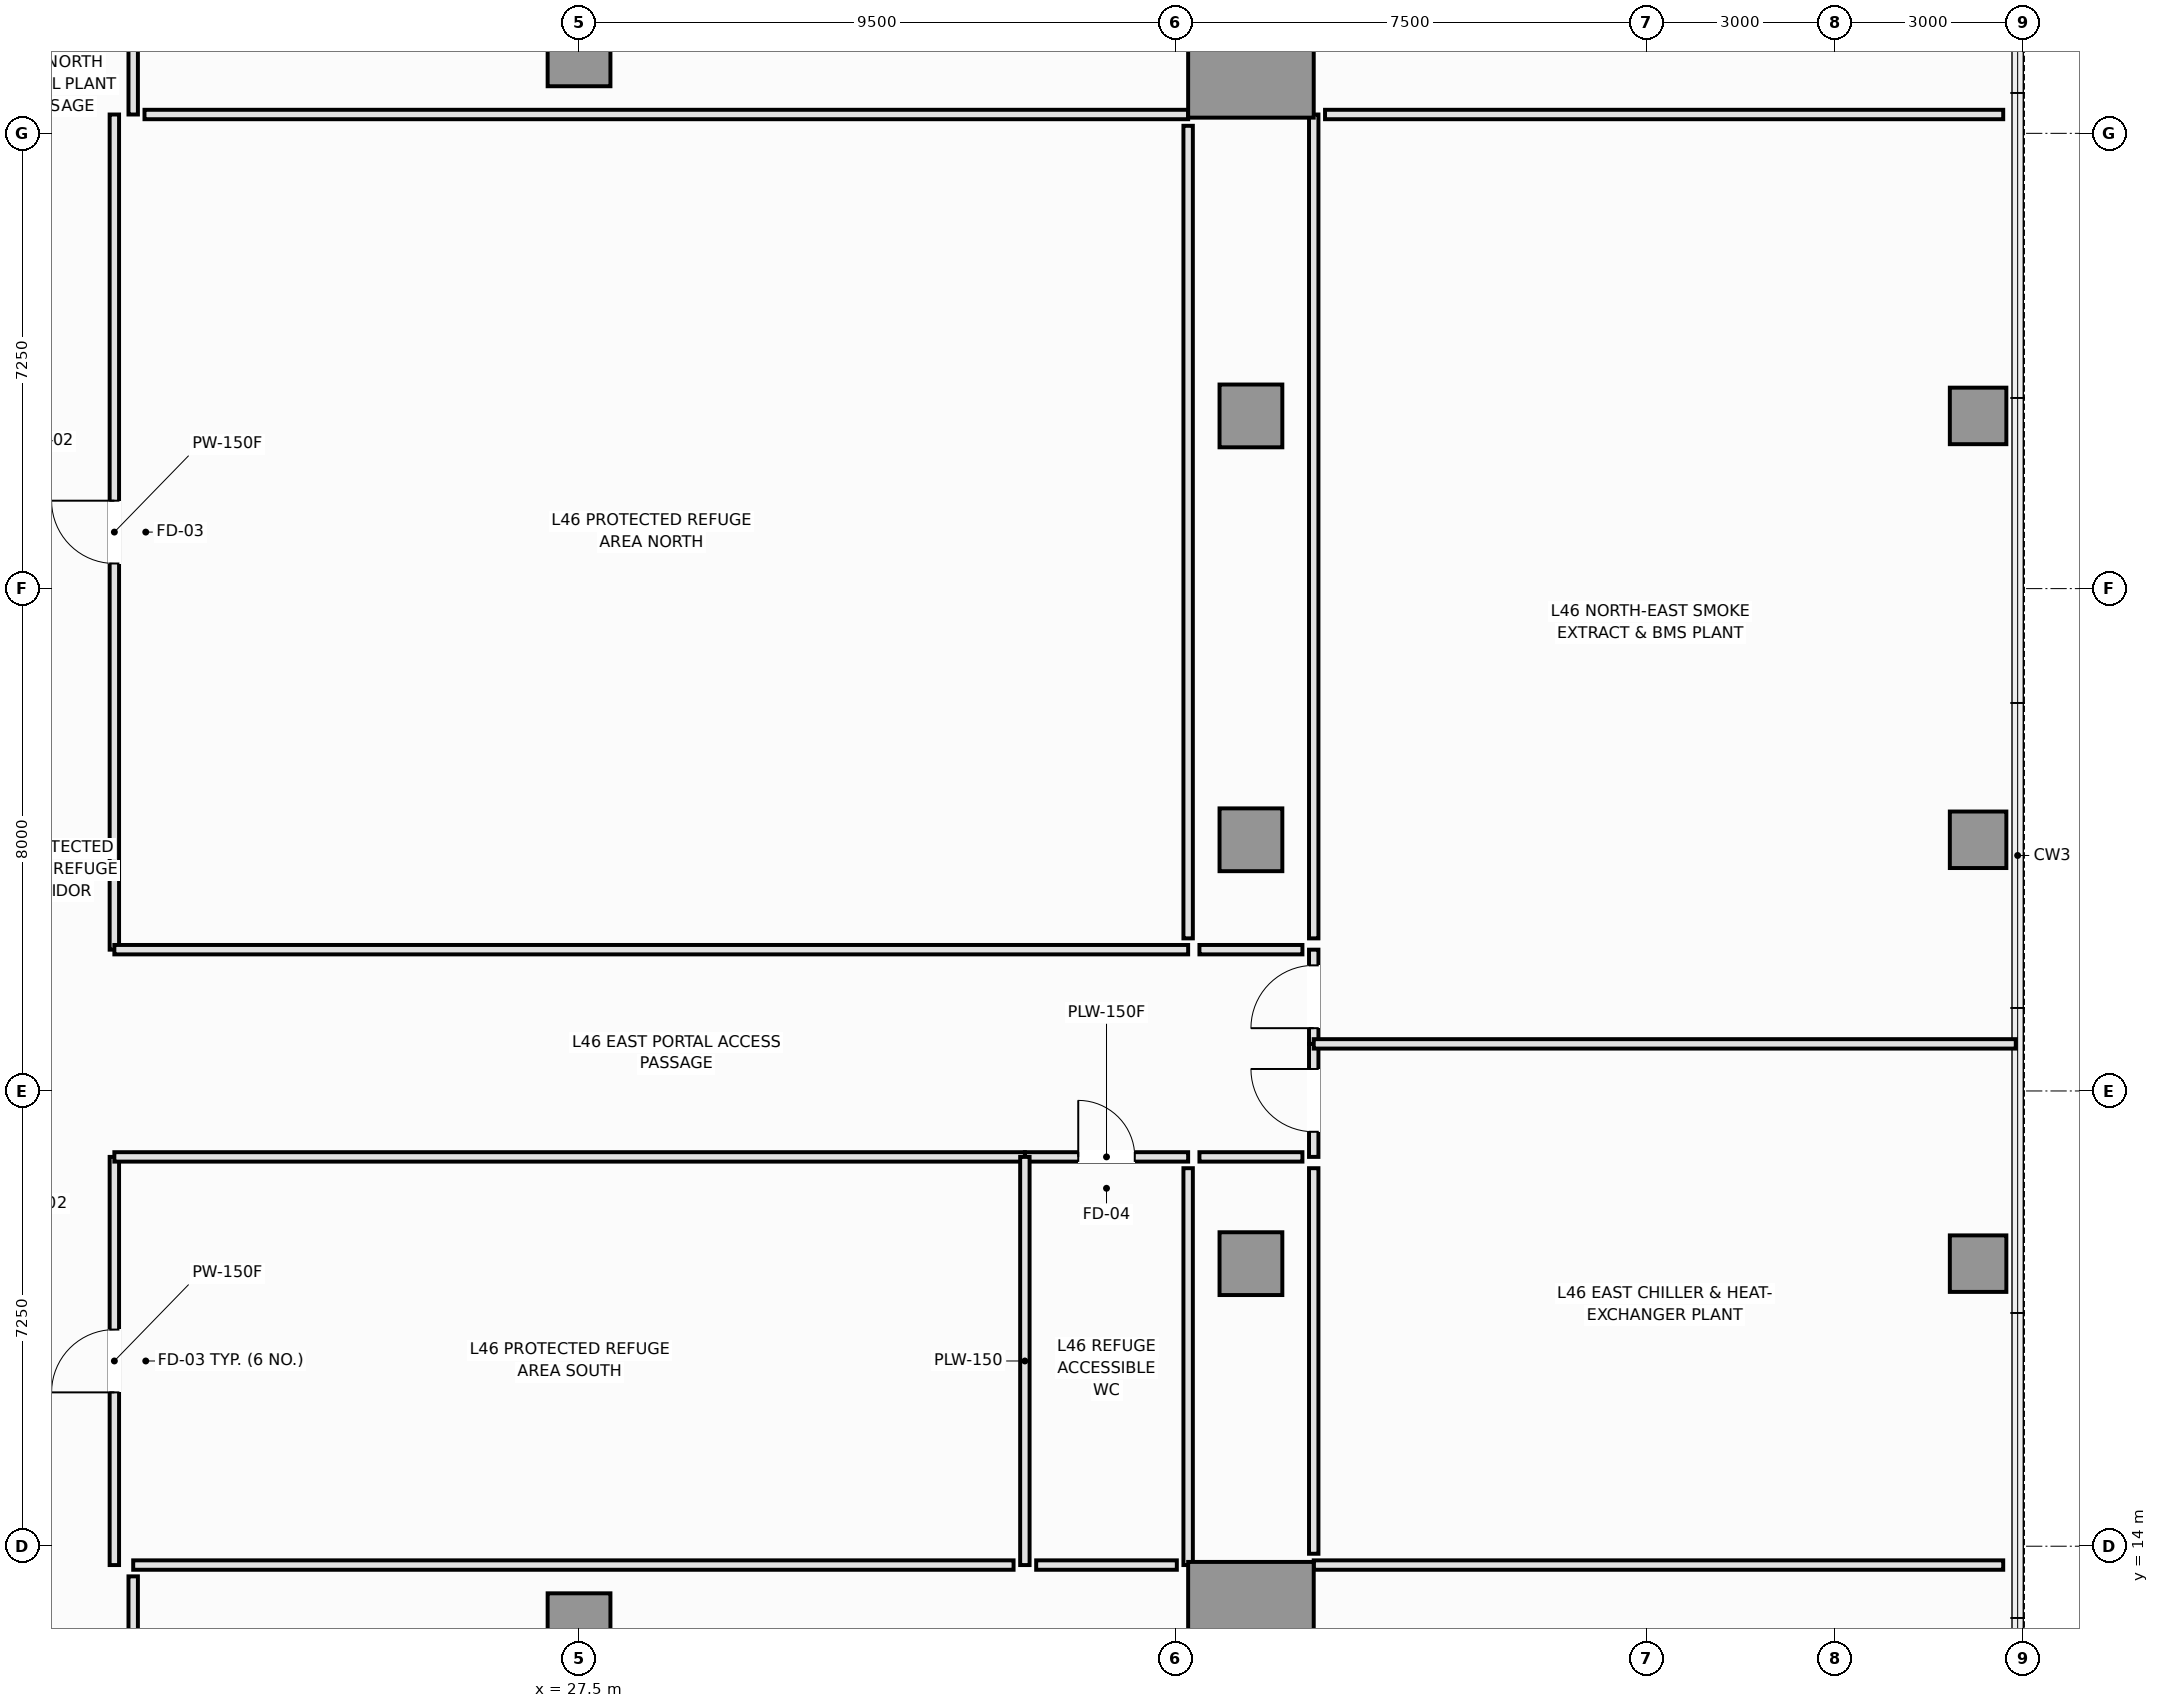
"""IFC4 building model, lengths in metres.
Left out: names, types, materials, properties, quantities, classifications, styles, units other than length and angle.
Written with IfcOpenShell. Run it as: python <this file> out.ifc"""

import sys

from ifc_helpers import new_model, si_unit, direction, frame, frame_2d, origin, origin_2d, place, context, subcontext, project, spatial, rectangle, extrude, element, fill, save


model = new_model("IFC4")
c1 = context("Model", 3, precision=1e-05, world=origin(), true_north=direction((0.0, 1.0)))
c2 = subcontext(c1, "Body", "Model", "MODEL_VIEW")
j1 = project(units=[si_unit("LENGTHUNIT", "METRE"), si_unit("PLANEANGLEUNIT", "RADIAN")], contexts=[c1])
p1 = place(None, origin())
s1 = spatial("IfcSite", under=j1, at=p1, CompositionType="ELEMENT")
p2 = place(p1, origin())
s2 = spatial("IfcBuilding", under=s1, at=p2, CompositionType="ELEMENT")
p3 = place(p2, frame((0.0, 0.0, 173.25)))
s3 = spatial("IfcBuildingStorey", under=s2, at=p3, CompositionType="ELEMENT", Elevation=173.25)
for number, where, z_axis, x_axis in (
    (1, (38.2, 12.75, 0.0), (0.0, 0.0, 1.0), (1.0, 0.0, 0.0)),
    (2, (38.2, 37.75, 0.0), (0.0, 0.0, 1.0), (1.0, 0.0, 0.0)),
):
    element("IfcColumn", number, at=place(p3, frame(where, z_axis=z_axis, x_axis=x_axis)), inside=s3, PredefinedType="COLUMN", context=c2, shape_type="SweptSolid", body=[
        extrude(rectangle(XDim=2.0, YDim=2.0, at=origin_2d()), origin(), (0.0, 0.0, 1.0), 4.8),
    ])
for number, where, z_axis, x_axis in (
    (3, (27.5, 12.75, 0.0), (0.0, 0.0, 1.0), (1.0, 0.0, 0.0)),
    (4, (27.5, 37.75, 0.0), (0.0, 0.0, 1.0), (1.0, 0.0, 0.0)),
    (5, (38.2, 18.5, 0.0), (0.0, 0.0, 1.0), (1.0, 0.0, 0.0)),
    (6, (38.2, 25.25, 0.0), (0.0, 0.0, 1.0), (1.0, 0.0, 0.0)),
    (7, (38.2, 32.0, 0.0), (0.0, 0.0, 1.0), (1.0, 0.0, 0.0)),
):
    element("IfcColumn", number, at=place(p3, frame(where, z_axis=z_axis, x_axis=x_axis)), inside=s3, PredefinedType="COLUMN", context=c2, shape_type="SweptSolid", body=[
        extrude(rectangle(XDim=1.0, YDim=1.0, at=origin_2d()), origin(), (0.0, 0.0, 1.0), 4.8),
    ])
for number, where, z_axis, x_axis in (
    (8, (49.78, 18.5, 0.0), (0.0, 0.0, 1.0), (1.0, 0.0, 0.0)),
    (9, (49.78, 25.25, 0.0), (0.0, 0.0, 1.0), (1.0, 0.0, 0.0)),
    (10, (49.78, 32.0, 0.0), (0.0, 0.0, 1.0), (1.0, 0.0, 0.0)),
):
    element("IfcColumn", number, at=place(p3, frame(where, z_axis=z_axis, x_axis=x_axis)), inside=s3, PredefinedType="COLUMN", context=c2, shape_type="SweptSolid", body=[
        extrude(rectangle(XDim=0.9, YDim=0.9, at=origin_2d()), origin(), (0.0, 0.0, 1.0), 4.8),
    ])
p4 = place(p3, frame((20.1, 13.7, 0.0), z_axis=(0.0, 0.0, 1.0), x_axis=(0.0, 1.0, 0.0)))
e11 = element("IfcWall", 11, at=p4, inside=s3, PredefinedType="PARTITIONING", context=c2, shape_type="SweptSolid", body=[
    extrude(rectangle(XDim=6.5, YDim=0.15, at=frame_2d((3.25, 0.0))), origin(), (0.0, 0.0, 1.0), 4.6),
])
p5 = place(p4, frame((2.75, 0.0, 0.0)))
e12 = element("IfcOpeningElement", 12, at=p5, cuts=e11, PredefinedType="OPENING", context=c2, shape_type="SweptSolid", body=[
    extrude(rectangle(XDim=1.0, YDim=2.15, at=frame_2d((0.5, 1.075))), frame((0.0, 0.085, 0.0), z_axis=(0.0, -1.0, 0.0), x_axis=(1.0, 0.0, 0.0)), (0.0, 0.0, 1.0), 0.17),
])
p6 = place(p3, frame((20.1, 23.5, 0.0), z_axis=(0.0, 0.0, 1.0), x_axis=(0.0, 1.0, 0.0)))
e13 = element("IfcWall", 13, at=p6, inside=s3, PredefinedType="PARTITIONING", context=c2, shape_type="SweptSolid", body=[
    extrude(rectangle(XDim=13.3, YDim=0.15, at=frame_2d((6.65, 0.0))), origin(), (0.0, 0.0, 1.0), 4.6),
])
p7 = place(p6, frame((6.15, 0.0, 0.0)))
e14 = element("IfcOpeningElement", 14, at=p7, cuts=e13, PredefinedType="OPENING", context=c2, shape_type="SweptSolid", body=[
    extrude(rectangle(XDim=1.0, YDim=2.15, at=frame_2d((0.5, 1.075))), frame((0.0, 0.085, 0.0), z_axis=(0.0, -1.0, 0.0), x_axis=(1.0, 0.0, 0.0)), (0.0, 0.0, 1.0), 0.17),
])
p8 = place(p3, frame((34.6, 20.2, 0.0), z_axis=(0.0, 0.0, 1.0), x_axis=(1.0, 0.0, 0.0)))
e15 = element("IfcWall", 15, at=p8, inside=s3, PredefinedType="PLUMBINGWALL", context=c2, shape_type="SweptSolid", body=[
    extrude(rectangle(XDim=2.6, YDim=0.15, at=frame_2d((1.3, 0.0))), origin(), (0.0, 0.0, 1.0), 4.6),
])
p9 = place(p8, frame((0.85, 0.0, 0.0)))
e16 = element("IfcOpeningElement", 16, at=p9, cuts=e15, PredefinedType="OPENING", context=c2, shape_type="SweptSolid", body=[
    extrude(rectangle(XDim=0.9, YDim=2.1, at=frame_2d((0.45, 1.05))), frame((0.0, 0.085, 0.0), z_axis=(0.0, -1.0, 0.0), x_axis=(1.0, 0.0, 0.0)), (0.0, 0.0, 1.0), 0.17),
])
p10 = place(p3, frame((20.1, 20.2, 0.0), z_axis=(0.0, 0.0, 1.0), x_axis=(1.0, 0.0, 0.0)))
e17 = element("IfcWall", 17, at=p10, inside=s3, PredefinedType="PARTITIONING", context=c2, shape_type="SweptSolid", body=[
    extrude(rectangle(XDim=14.5, YDim=0.15, at=frame_2d((7.25, 0.0))), origin(), (0.0, 0.0, 1.0), 4.6),
])
p11 = place(p3, frame((20.1, 23.5, 0.0), z_axis=(0.0, 0.0, 1.0), x_axis=(1.0, 0.0, 0.0)))
e18 = element("IfcWall", 18, at=p11, inside=s3, PredefinedType="PARTITIONING", context=c2, shape_type="SweptSolid", body=[
    extrude(rectangle(XDim=17.1, YDim=0.15, at=frame_2d((8.55, 0.0))), origin(), (0.0, 0.0, 1.0), 4.6),
])
p12 = place(p3, frame((39.2, 20.2, 0.0), z_axis=(0.0, 0.0, 1.0), x_axis=(0.0, 1.0, 0.0)))
e19 = element("IfcWall", 19, at=p12, inside=s3, PredefinedType="PARTITIONING", context=c2, shape_type="SweptSolid", body=[
    extrude(rectangle(XDim=1.8, YDim=0.15, at=frame_2d((0.9, 0.0))), origin(), (0.0, 0.0, 1.0), 4.6),
])
p13 = place(p12, frame((0.4, 0.0, 0.0)))
e20 = element("IfcOpeningElement", 20, at=p13, cuts=e19, PredefinedType="OPENING", context=c2, shape_type="SweptSolid", body=[
    extrude(rectangle(XDim=1.0, YDim=2.15, at=frame_2d((0.5, 1.075))), frame((0.0, 0.085, 0.0), z_axis=(0.0, -1.0, 0.0), x_axis=(1.0, 0.0, 0.0)), (0.0, 0.0, 1.0), 0.17),
])
p14 = place(p3, frame((39.2, 22.0, 0.0), z_axis=(0.0, 0.0, 1.0), x_axis=(0.0, 1.0, 0.0)))
e21 = element("IfcWall", 21, at=p14, inside=s3, PredefinedType="PARTITIONING", context=c2, shape_type="SweptSolid", body=[
    extrude(rectangle(XDim=1.5, YDim=0.15, at=frame_2d((0.75, 0.0))), origin(), (0.0, 0.0, 1.0), 4.6),
])
p15 = place(p14, frame((0.25, 0.0, 0.0)))
e22 = element("IfcOpeningElement", 22, at=p15, cuts=e21, PredefinedType="OPENING", context=c2, shape_type="SweptSolid", body=[
    extrude(rectangle(XDim=1.0, YDim=2.15, at=frame_2d((0.5, 1.075))), frame((0.0, 0.085, 0.0), z_axis=(0.0, -1.0, 0.0), x_axis=(1.0, 0.0, 0.0)), (0.0, 0.0, 1.0), 0.17),
])
p16 = place(p3, frame((34.6, 13.7, 0.0), z_axis=(0.0, 0.0, 1.0), x_axis=(0.0, 1.0, 0.0)))
e23 = element("IfcWall", 23, at=p16, inside=s3, PredefinedType="PLUMBINGWALL", context=c2, shape_type="SweptSolid", body=[
    extrude(rectangle(XDim=6.5, YDim=0.15, at=frame_2d((3.25, 0.0))), origin(), (0.0, 0.0, 1.0), 4.6),
])
p17 = place(p3, frame((39.2, 22.0, 0.0), z_axis=(0.0, 0.0, 1.0), x_axis=(1.0, 0.0, 0.0)))
e24 = element("IfcWall", 24, at=p17, inside=s3, PredefinedType="PARTITIONING", context=c2, shape_type="SweptSolid", body=[
    extrude(rectangle(XDim=11.18, YDim=0.15, at=frame_2d((5.59, 0.0))), origin(), (0.0, 0.0, 1.0), 4.6),
])
p18 = place(p3, frame((20.4, 38.57, 0.0), z_axis=(0.0, 0.0, 1.0), x_axis=(0.0, -1.0, 0.0)))
e25 = element("IfcWall", 25, at=p18, inside=s3, PredefinedType="PARTITIONING", context=c2, shape_type="SweptSolid", body=[
    extrude(rectangle(XDim=1.77, YDim=0.15, at=frame_2d((0.885, 0.0))), origin(), (0.0, 0.0, 1.0), 4.6),
])
p19 = place(p3, frame((20.58, 36.8, 0.0), z_axis=(0.0, 0.0, 1.0), x_axis=(1.0, 0.0, 0.0)))
e26 = element("IfcWall", 26, at=p19, inside=s3, PredefinedType="PARTITIONING", context=c2, shape_type="SweptSolid", body=[
    extrude(rectangle(XDim=16.62, YDim=0.15, at=frame_2d((8.31, 0.0))), origin(), (0.0, 0.0, 1.0), 4.6),
])
p20 = place(p3, frame((37.2, 36.62, 0.0), z_axis=(0.0, 0.0, 1.0), x_axis=(0.0, -1.0, 0.0)))
e27 = element("IfcWall", 27, at=p20, inside=s3, PredefinedType="PARTITIONING", context=c2, shape_type="SweptSolid", body=[
    extrude(rectangle(XDim=12.94, YDim=0.15, at=frame_2d((6.47, 0.0))), origin(), (0.0, 0.0, 1.0), 4.6),
])
p21 = place(p3, frame((37.38, 23.5, 0.0), z_axis=(0.0, 0.0, 1.0), x_axis=(1.0, 0.0, 0.0)))
e28 = element("IfcWall", 28, at=p21, inside=s3, PredefinedType="PARTITIONING", context=c2, shape_type="SweptSolid", body=[
    extrude(rectangle(XDim=1.64, YDim=0.15, at=frame_2d((0.82, 0.0))), origin(), (0.0, 0.0, 1.0), 4.6),
])
p22 = place(p3, frame((39.2, 23.68, 0.0), z_axis=(0.0, 0.0, 1.0), x_axis=(0.0, 1.0, 0.0)))
e29 = element("IfcWall", 29, at=p22, inside=s3, PredefinedType="PARTITIONING", context=c2, shape_type="SweptSolid", body=[
    extrude(rectangle(XDim=13.12, YDim=0.15, at=frame_2d((6.56, 0.0))), origin(), (0.0, 0.0, 1.0), 4.6),
])
p23 = place(p3, frame((39.38, 36.8, 0.0), z_axis=(0.0, 0.0, 1.0), x_axis=(1.0, 0.0, 0.0)))
e30 = element("IfcWall", 30, at=p23, inside=s3, PredefinedType="PARTITIONING", context=c2, shape_type="SweptSolid", body=[
    extrude(rectangle(XDim=10.8, YDim=0.15, at=frame_2d((5.4, 0.0))), origin(), (0.0, 0.0, 1.0), 4.6),
])
p24 = place(p3, frame((50.18, 13.7, 0.0), z_axis=(0.0, 0.0, 1.0), x_axis=(-1.0, 0.0, 0.0)))
e31 = element("IfcWall", 31, at=p24, inside=s3, PredefinedType="PARTITIONING", context=c2, shape_type="SweptSolid", body=[
    extrude(rectangle(XDim=10.98, YDim=0.15, at=frame_2d((5.49, 0.0))), origin(), (0.0, 0.0, 1.0), 4.6),
])
p25 = place(p3, frame((39.2, 13.88, 0.0), z_axis=(0.0, 0.0, 1.0), x_axis=(0.0, 1.0, 0.0)))
e32 = element("IfcWall", 32, at=p25, inside=s3, PredefinedType="PARTITIONING", context=c2, shape_type="SweptSolid", body=[
    extrude(rectangle(XDim=6.14, YDim=0.15, at=frame_2d((3.07, 0.0))), origin(), (0.0, 0.0, 1.0), 4.6),
])
p26 = place(p3, frame((39.02, 20.2, 0.0), z_axis=(0.0, 0.0, 1.0), x_axis=(-1.0, 0.0, 0.0)))
e33 = element("IfcWall", 33, at=p26, inside=s3, PredefinedType="PARTITIONING", context=c2, shape_type="SweptSolid", body=[
    extrude(rectangle(XDim=1.64, YDim=0.15, at=frame_2d((0.82, 0.0))), origin(), (0.0, 0.0, 1.0), 4.6),
])
p27 = place(p3, frame((37.2, 20.02, 0.0), z_axis=(0.0, 0.0, 1.0), x_axis=(0.0, -1.0, 0.0)))
e34 = element("IfcWall", 34, at=p27, inside=s3, PredefinedType="PARTITIONING", context=c2, shape_type="SweptSolid", body=[
    extrude(rectangle(XDim=6.32, YDim=0.15, at=frame_2d((3.16, 0.0))), origin(), (0.0, 0.0, 1.0), 4.6),
])
p28 = place(p3, frame((37.02, 13.7, 0.0), z_axis=(0.0, 0.0, 1.0), x_axis=(-1.0, 0.0, 0.0)))
e35 = element("IfcWall", 35, at=p28, inside=s3, PredefinedType="PARTITIONING", context=c2, shape_type="SweptSolid", body=[
    extrude(rectangle(XDim=2.24, YDim=0.15, at=frame_2d((1.12, 0.0))), origin(), (0.0, 0.0, 1.0), 4.6),
])
p29 = place(p3, frame((34.42, 13.7, 0.0), z_axis=(0.0, 0.0, 1.0), x_axis=(-1.0, 0.0, 0.0)))
e36 = element("IfcWall", 36, at=p29, inside=s3, PredefinedType="PARTITIONING", context=c2, shape_type="SweptSolid", body=[
    extrude(rectangle(XDim=14.02, YDim=0.15, at=frame_2d((7.01, 0.0))), origin(), (0.0, 0.0, 1.0), 4.6),
])
p30 = place(p3, frame((20.4, 13.52, 0.0), z_axis=(0.0, 0.0, 1.0), x_axis=(0.0, -1.0, 0.0)))
e37 = element("IfcWall", 37, at=p30, inside=s3, PredefinedType="PARTITIONING", context=c2, shape_type="SweptSolid", body=[
    extrude(rectangle(XDim=1.59, YDim=0.15, at=frame_2d((0.795, 0.0))), origin(), (0.0, 0.0, 1.0), 4.6),
])
p31 = place(p5, origin())
e38 = element("IfcDoor", 38, at=p31, inside=s3, OperationType="SINGLE_SWING_LEFT", PredefinedType="DOOR", context=c2, shape_type="SweptSolid", body=[
    extrude(rectangle(XDim=1.0, YDim=2.15, at=frame_2d((0.5, 1.075))), frame((0.0, 0.025, 0.0), z_axis=(0.0, -1.0, 0.0), x_axis=(1.0, 0.0, 0.0)), (0.0, 0.0, 1.0), 0.05),
])
fill(e12, e38)
p32 = place(p7, origin())
e39 = element("IfcDoor", 39, at=p32, inside=s3, OperationType="SINGLE_SWING_RIGHT", PredefinedType="DOOR", context=c2, shape_type="SweptSolid", body=[
    extrude(rectangle(XDim=1.0, YDim=2.15, at=frame_2d((0.5, 1.075))), frame((0.0, 0.025, 0.0), z_axis=(0.0, -1.0, 0.0), x_axis=(1.0, 0.0, 0.0)), (0.0, 0.0, 1.0), 0.05),
])
fill(e14, e39)
p33 = place(p9, origin())
e40 = element("IfcDoor", 40, at=p33, inside=s3, OperationType="SINGLE_SWING_LEFT", PredefinedType="DOOR", context=c2, shape_type="SweptSolid", body=[
    extrude(rectangle(XDim=0.9, YDim=2.1, at=frame_2d((0.45, 1.05))), frame((0.0, 0.025, 0.0), z_axis=(0.0, -1.0, 0.0), x_axis=(1.0, 0.0, 0.0)), (0.0, 0.0, 1.0), 0.05),
])
fill(e16, e40)
p34 = place(p13, origin())
e41 = element("IfcDoor", 41, at=p34, inside=s3, OperationType="SINGLE_SWING_RIGHT", PredefinedType="DOOR", context=c2, shape_type="SweptSolid", body=[
    extrude(rectangle(XDim=1.0, YDim=2.15, at=frame_2d((0.5, 1.075))), frame((0.0, 0.025, 0.0), z_axis=(0.0, -1.0, 0.0), x_axis=(1.0, 0.0, 0.0)), (0.0, 0.0, 1.0), 0.05),
])
fill(e20, e41)
p35 = place(p15, origin())
e42 = element("IfcDoor", 42, at=p35, inside=s3, OperationType="SINGLE_SWING_LEFT", PredefinedType="DOOR", context=c2, shape_type="SweptSolid", body=[
    extrude(rectangle(XDim=1.0, YDim=2.15, at=frame_2d((0.5, 1.075))), frame((0.0, 0.025, 0.0), z_axis=(0.0, -1.0, 0.0), x_axis=(1.0, 0.0, 0.0)), (0.0, 0.0, 1.0), 0.05),
])
fill(e22, e42)
save(model, sys.argv[1])
